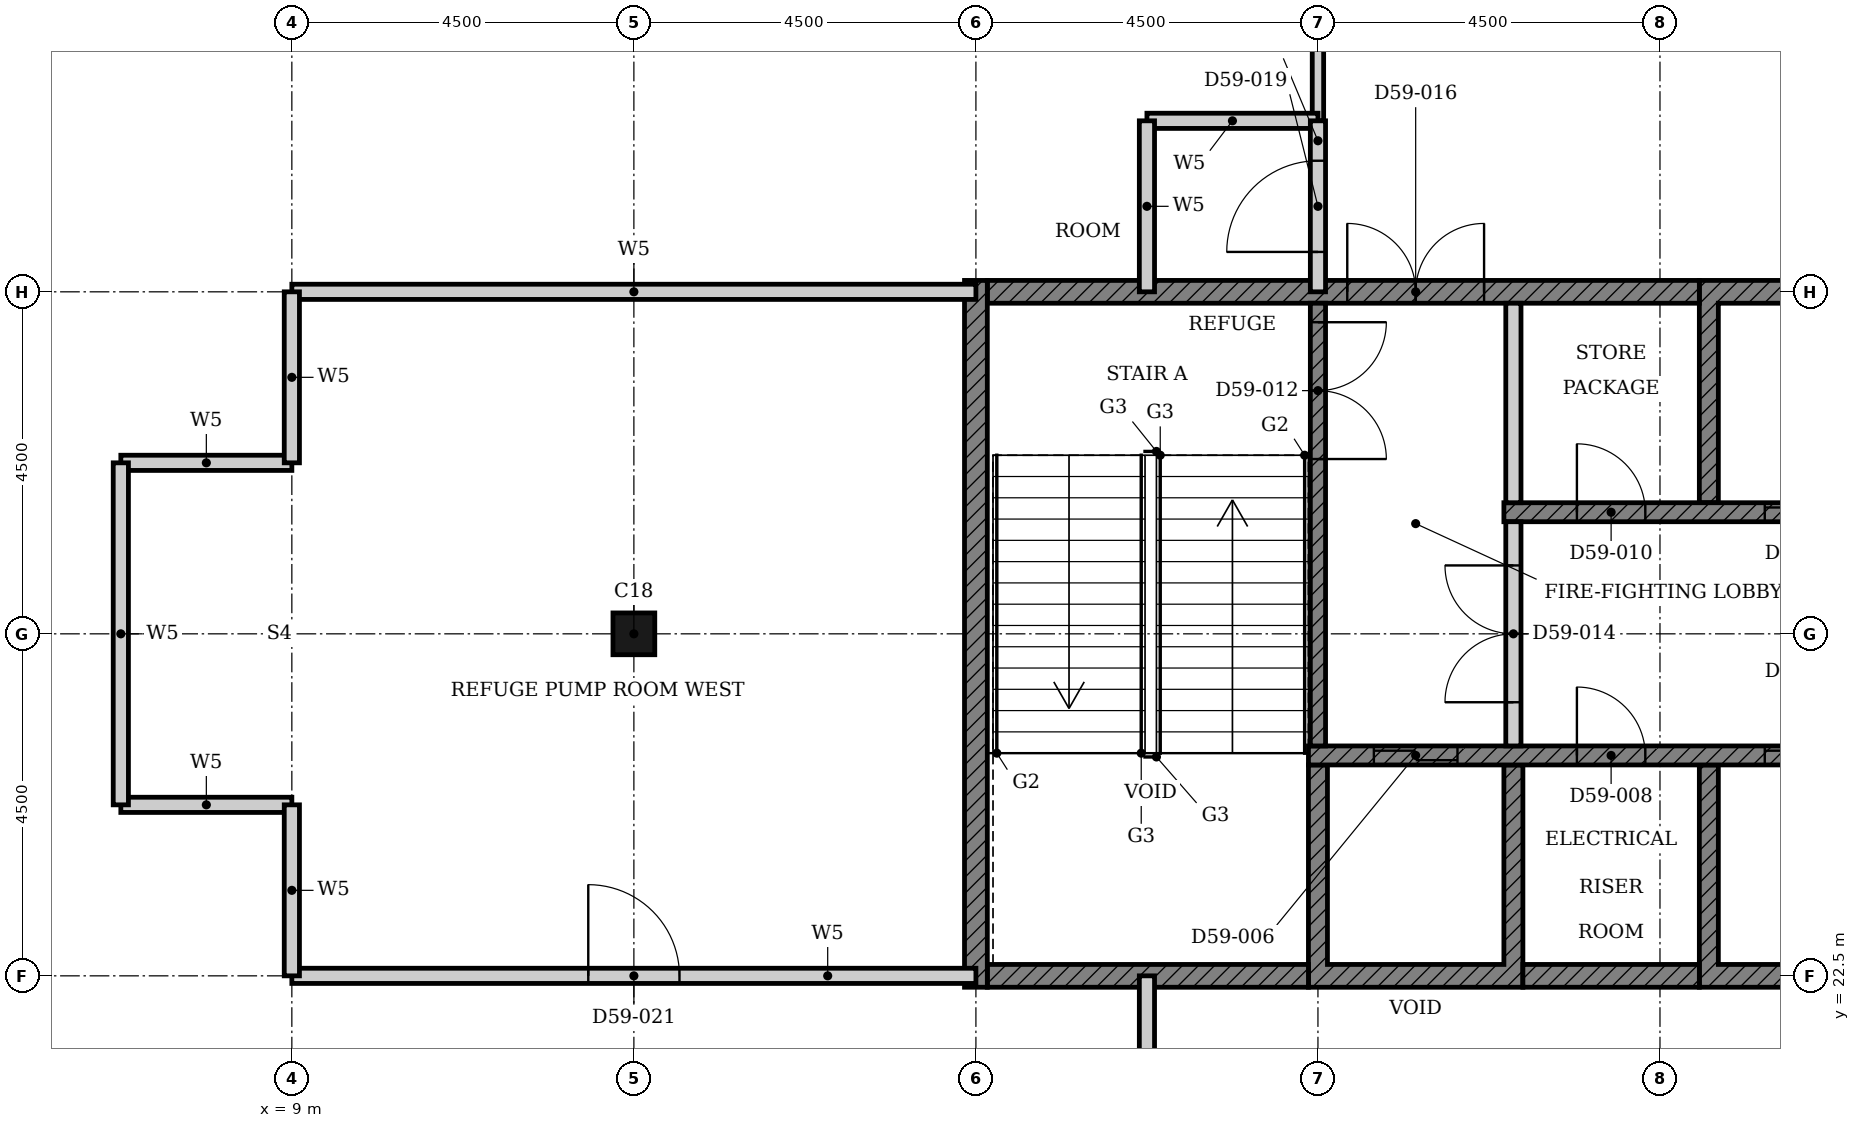
"""IFC4 building model, lengths in metres.
Left out: names, types, materials, properties, quantities, classifications, styles, units other than length and angle.
Written with IfcOpenShell. Run it as: python <this file> out.ifc"""

import sys

from ifc_helpers import new_model, si_unit, direction, frame, frame_2d, origin, origin_2d, place, context, subcontext, project, spatial, polyline, rectangle, hollow_rectangle, outline, extrude, element, fill, save


model = new_model("IFC4")
c1 = context("Model", 3, precision=1e-05, world=origin(), true_north=direction((0.0, 1.0)))
c2 = subcontext(c1, "Body", "Model", "MODEL_VIEW")
j1 = project(units=[si_unit("LENGTHUNIT", "METRE"), si_unit("PLANEANGLEUNIT", "RADIAN")], contexts=[c1])
p1 = place(None, origin())
s1 = spatial("IfcSite", under=j1, at=p1, CompositionType="ELEMENT")
p2 = place(p1, origin())
s2 = spatial("IfcBuilding", under=s1, at=p2, CompositionType="ELEMENT")
p3 = place(p2, frame((0.0, 0.0, 233.1)))
s3 = spatial("IfcBuildingStorey", under=s2, at=p3, CompositionType="ELEMENT", Elevation=233.1)
p4 = place(p3, frame((13.5, 27.0, 0.0), z_axis=(0.0, 0.0, 1.0), x_axis=(1.0, 0.0, 0.0)))
e1 = element("IfcColumn", 1, at=p4, inside=s3, PredefinedType="COLUMN", context=c2, shape_type="SweptSolid", body=[
    extrude(hollow_rectangle(XDim=0.55, YDim=0.55, WallThickness=0.018, at=origin_2d()), origin(), (0.0, 0.0, 1.0), 4.8),
])
p5 = place(p3, origin())
e2 = element("IfcWall", 2, at=p5, inside=s3, PredefinedType="SHEAR", context=c2, shape_type="SweptSolid", body=[
    extrude(outline(polyline([(22.375, 22.35), (25.197, 22.35), (25.197, 25.275), (24.947, 25.275), (24.947, 22.65), (22.625, 22.65), (22.625, 25.275), (22.375, 25.275), (22.375, 22.35)])), origin(), (0.0, 0.0, 1.0), 4.5),
])
p6 = place(p3, origin())
e3 = element("IfcWall", 3, at=p6, inside=s3, PredefinedType="SHEAR", context=c2, shape_type="SweptSolid", body=[
    extrude(outline(polyline([(27.518, 22.35), (32.911, 22.35), (32.911, 25.275), (32.661, 25.275), (32.661, 22.65), (30.339, 22.65), (30.339, 25.275), (30.089, 25.275), (30.089, 22.65), (27.768, 22.65), (27.768, 25.275), (27.518, 25.275), (27.518, 22.35)])), origin(), (0.0, 0.0, 1.0), 4.5),
])
p7 = place(p3, origin())
e4 = element("IfcWall", 4, at=p7, inside=s3, PredefinedType="SHEAR", context=c2, shape_type="SweptSolid", body=[
    extrude(outline(polyline([(27.518, 28.725), (27.768, 28.725), (27.768, 31.35), (30.089, 31.35), (30.089, 28.725), (30.339, 28.725), (30.339, 31.35), (32.661, 31.35), (32.661, 28.725), (32.911, 28.725), (32.911, 31.65), (27.518, 31.65), (27.518, 28.725)])), origin(), (0.0, 0.0, 1.0), 4.5),
])
p8 = place(p3, frame((18.15, 22.5, 0.0), z_axis=(0.0, 0.0, 1.0), x_axis=(1.0, 0.0, 0.0)))
e5 = element("IfcWall", 5, at=p8, inside=s3, PredefinedType="SHEAR", context=c2, shape_type="SweptSolid", body=[
    extrude(rectangle(XDim=4.225, YDim=0.3, at=frame_2d((2.113, 0.0))), origin(), (0.0, 0.0, 1.0), 4.5),
])
p9 = place(p3, frame((25.197, 22.5, 0.0), z_axis=(0.0, 0.0, 1.0), x_axis=(1.0, 0.0, 0.0)))
e6 = element("IfcWall", 6, at=p9, inside=s3, PredefinedType="SHEAR", context=c2, shape_type="SweptSolid", body=[
    extrude(rectangle(XDim=2.321, YDim=0.3, at=frame_2d((1.161, 0.0))), origin(), (0.0, 0.0, 1.0), 4.5),
])
p10 = place(p3, frame((18.15, 31.5, 0.0), z_axis=(0.0, 0.0, 1.0), x_axis=(1.0, 0.0, 0.0)))
e7 = element("IfcWall", 7, at=p10, inside=s3, PredefinedType="SHEAR", context=c2, shape_type="SweptSolid", body=[
    extrude(rectangle(XDim=9.368, YDim=0.3, at=frame_2d((4.684, 0.0))), origin(), (0.0, 0.0, 1.0), 4.5),
])
p11 = place(p10, frame((4.736, 0.0, 0.0)))
e8 = element("IfcOpeningElement", 8, at=p11, cuts=e7, PredefinedType="OPENING", context=c2, shape_type="SweptSolid", body=[
    extrude(rectangle(XDim=1.8, YDim=2.1, at=frame_2d((0.9, 1.05))), frame((0.0, 0.16, 0.0), z_axis=(0.0, -1.0, 0.0), x_axis=(1.0, 0.0, 0.0)), (0.0, 0.0, 1.0), 0.32),
])
p12 = place(p3, frame((18.0, 22.35, 0.0), z_axis=(0.0, 0.0, 1.0), x_axis=(0.0, 1.0, 0.0)))
e9 = element("IfcWall", 9, at=p12, inside=s3, PredefinedType="SHEAR", context=c2, shape_type="SweptSolid", body=[
    extrude(rectangle(XDim=9.3, YDim=0.3, at=frame_2d((4.65, 0.0))), origin(), (0.0, 0.0, 1.0), 4.5),
])
p13 = place(p3, frame((22.375, 25.4, 0.0), z_axis=(0.0, 0.0, 1.0), x_axis=(1.0, 0.0, 0.0)))
e10 = element("IfcWall", 10, at=p13, inside=s3, PredefinedType="SHEAR", context=c2, shape_type="SweptSolid", body=[
    extrude(rectangle(XDim=15.678, YDim=0.25, at=frame_2d((7.839, 0.0))), origin(), (0.0, 0.0, 1.0), 4.5),
])
p14 = place(p13, frame((8.575, 0.0, 0.0)))
e11 = element("IfcOpeningElement", 11, at=p14, cuts=e10, PredefinedType="OPENING", context=c2, shape_type="SweptSolid", body=[
    extrude(rectangle(XDim=1.1, YDim=2.1, at=frame_2d((0.55, 1.05))), frame((0.0, 0.135, 0.0), z_axis=(0.0, -1.0, 0.0), x_axis=(1.0, 0.0, 0.0)), (0.0, 0.0, 1.0), 0.27),
])
p15 = place(p13, frame((6.004, 0.0, 0.0)))
e12 = element("IfcOpeningElement", 12, at=p15, cuts=e10, PredefinedType="OPENING", context=c2, shape_type="SweptSolid", body=[
    extrude(rectangle(XDim=1.1, YDim=2.1, at=frame_2d((0.55, 1.05))), frame((0.0, 0.135, 0.0), z_axis=(0.0, -1.0, 0.0), x_axis=(1.0, 0.0, 0.0)), (0.0, 0.0, 1.0), 0.27),
])
p16 = place(p13, frame((0.861, 0.0, 0.0)))
e13 = element("IfcOpeningElement", 13, at=p16, cuts=e10, PredefinedType="OPENING", context=c2, shape_type="SweptSolid", body=[
    extrude(rectangle(XDim=1.1, YDim=2.1, at=frame_2d((0.55, 1.05))), frame((0.0, 0.135, 0.0), z_axis=(0.0, -1.0, 0.0), x_axis=(1.0, 0.0, 0.0)), (0.0, 0.0, 1.0), 0.27),
])
p17 = place(p13, frame((3.532, 0.0, 0.0)))
e14 = element("IfcOpeningElement", 14, at=p17, cuts=e10, PredefinedType="OPENING", context=c2, shape_type="SweptSolid", body=[
    extrude(rectangle(XDim=0.9, YDim=2.1, at=frame_2d((0.45, 1.05))), frame((0.0, 0.135, 0.0), z_axis=(0.0, -1.0, 0.0), x_axis=(1.0, 0.0, 0.0)), (0.0, 0.0, 1.0), 0.27),
])
p18 = place(p13, frame((12.532, 0.0, 0.0)))
e15 = element("IfcOpeningElement", 15, at=p18, cuts=e10, PredefinedType="OPENING", context=c2, shape_type="SweptSolid", body=[
    extrude(rectangle(XDim=0.9, YDim=2.1, at=frame_2d((0.45, 1.05))), frame((0.0, 0.135, 0.0), z_axis=(0.0, -1.0, 0.0), x_axis=(1.0, 0.0, 0.0)), (0.0, 0.0, 1.0), 0.27),
])
p19 = place(p3, frame((24.947, 28.6, 0.0), z_axis=(0.0, 0.0, 1.0), x_axis=(1.0, 0.0, 0.0)))
e16 = element("IfcWall", 16, at=p19, inside=s3, PredefinedType="SHEAR", context=c2, shape_type="SweptSolid", body=[
    extrude(rectangle(XDim=15.678, YDim=0.25, at=frame_2d((7.839, 0.0))), origin(), (0.0, 0.0, 1.0), 4.5),
])
p20 = place(p19, frame((6.004, 0.0, 0.0)))
e17 = element("IfcOpeningElement", 17, at=p20, cuts=e16, PredefinedType="OPENING", context=c2, shape_type="SweptSolid", body=[
    extrude(rectangle(XDim=1.1, YDim=2.1, at=frame_2d((0.55, 1.05))), frame((0.0, 0.135, 0.0), z_axis=(0.0, -1.0, 0.0), x_axis=(1.0, 0.0, 0.0)), (0.0, 0.0, 1.0), 0.27),
])
p21 = place(p19, frame((11.146, 0.0, 0.0)))
e18 = element("IfcOpeningElement", 18, at=p21, cuts=e16, PredefinedType="OPENING", context=c2, shape_type="SweptSolid", body=[
    extrude(rectangle(XDim=1.1, YDim=2.1, at=frame_2d((0.55, 1.05))), frame((0.0, 0.135, 0.0), z_axis=(0.0, -1.0, 0.0), x_axis=(1.0, 0.0, 0.0)), (0.0, 0.0, 1.0), 0.27),
])
p22 = place(p19, frame((3.432, 0.0, 0.0)))
e19 = element("IfcOpeningElement", 19, at=p22, cuts=e16, PredefinedType="OPENING", context=c2, shape_type="SweptSolid", body=[
    extrude(rectangle(XDim=1.1, YDim=2.1, at=frame_2d((0.55, 1.05))), frame((0.0, 0.135, 0.0), z_axis=(0.0, -1.0, 0.0), x_axis=(1.0, 0.0, 0.0)), (0.0, 0.0, 1.0), 0.27),
])
p23 = place(p19, frame((13.718, 0.0, 0.0)))
e20 = element("IfcOpeningElement", 20, at=p23, cuts=e16, PredefinedType="OPENING", context=c2, shape_type="SweptSolid", body=[
    extrude(rectangle(XDim=1.1, YDim=2.1, at=frame_2d((0.55, 1.05))), frame((0.0, 0.135, 0.0), z_axis=(0.0, -1.0, 0.0), x_axis=(1.0, 0.0, 0.0)), (0.0, 0.0, 1.0), 0.27),
])
p24 = place(p19, frame((0.961, 0.0, 0.0)))
e21 = element("IfcOpeningElement", 21, at=p24, cuts=e16, PredefinedType="OPENING", context=c2, shape_type="SweptSolid", body=[
    extrude(rectangle(XDim=0.9, YDim=2.1, at=frame_2d((0.45, 1.05))), frame((0.0, 0.135, 0.0), z_axis=(0.0, -1.0, 0.0), x_axis=(1.0, 0.0, 0.0)), (0.0, 0.0, 1.0), 0.27),
])
p25 = place(p19, frame((8.675, 0.0, 0.0)))
e22 = element("IfcOpeningElement", 22, at=p25, cuts=e16, PredefinedType="OPENING", context=c2, shape_type="SweptSolid", body=[
    extrude(rectangle(XDim=0.9, YDim=2.1, at=frame_2d((0.45, 1.05))), frame((0.0, 0.135, 0.0), z_axis=(0.0, -1.0, 0.0), x_axis=(1.0, 0.0, 0.0)), (0.0, 0.0, 1.0), 0.27),
])
p26 = place(p3, frame((25.072, 28.725, 0.0), z_axis=(0.0, 0.0, 1.0), x_axis=(0.0, 1.0, 0.0)))
e23 = element("IfcWall", 23, at=p26, inside=s3, PredefinedType="PARTITIONING", context=c2, shape_type="SweptSolid", body=[
    extrude(rectangle(XDim=2.625, YDim=0.2, at=frame_2d((1.312, 0.0))), origin(), (0.0, 0.0, 1.0), 4.5),
])
p27 = place(p3, frame((22.5, 31.35, 0.0), z_axis=(0.0, 0.0, 1.0), x_axis=(0.0, -1.0, 0.0)))
e24 = element("IfcWall", 24, at=p27, inside=s3, PredefinedType="SHEAR", context=c2, shape_type="SweptSolid", body=[
    extrude(rectangle(XDim=5.825, YDim=0.2, at=frame_2d((2.913, 0.0))), origin(), (0.0, 0.0, 1.0), 4.5),
])
p28 = place(p27, frame((0.25, 0.0, 0.0)))
e25 = element("IfcOpeningElement", 25, at=p28, cuts=e24, PredefinedType="OPENING", context=c2, shape_type="SweptSolid", body=[
    extrude(rectangle(XDim=1.8, YDim=2.1, at=frame_2d((0.9, 1.05))), frame((0.0, 0.11, 0.0), z_axis=(0.0, -1.0, 0.0), x_axis=(1.0, 0.0, 0.0)), (0.0, 0.0, 1.0), 0.22),
])
p29 = place(p3, frame((25.072, 25.525, 0.0), z_axis=(0.0, 0.0, 1.0), x_axis=(0.0, 1.0, 0.0)))
e26 = element("IfcWall", 26, at=p29, inside=s3, PredefinedType="PARTITIONING", context=c2, shape_type="SweptSolid", body=[
    extrude(rectangle(XDim=2.95, YDim=0.2, at=frame_2d((1.475, 0.0))), origin(), (0.0, 0.0, 1.0), 4.5),
])
p30 = place(p29, frame((0.575, 0.0, 0.0)))
e27 = element("IfcOpeningElement", 27, at=p30, cuts=e26, PredefinedType="OPENING", context=c2, shape_type="SweptSolid", body=[
    extrude(rectangle(XDim=1.8, YDim=2.1, at=frame_2d((0.9, 1.05))), frame((0.0, 0.11, 0.0), z_axis=(0.0, -1.0, 0.0), x_axis=(1.0, 0.0, 0.0)), (0.0, 0.0, 1.0), 0.22),
])
p31 = place(p3, frame((22.5, 33.75, 0.0), z_axis=(0.0, 0.0, 1.0), x_axis=(0.0, 1.0, 0.0)))
e28 = element("IfcWall", 28, at=p31, inside=s3, PredefinedType="PARTITIONING", context=c2, shape_type="SweptSolid", body=[
    extrude(rectangle(XDim=2.25, YDim=0.15, at=frame_2d((1.125, 0.0))), origin(), (0.0, 0.0, 1.0), 4.5),
])
p32 = place(p3, frame((9.0, 22.5, 0.0), z_axis=(0.0, 0.0, 1.0), x_axis=(1.0, 0.0, 0.0)))
e29 = element("IfcWall", 29, at=p32, inside=s3, PredefinedType="PARTITIONING", context=c2, shape_type="SweptSolid", body=[
    extrude(rectangle(XDim=9.0, YDim=0.2, at=frame_2d((4.5, 0.0))), origin(), (0.0, 0.0, 1.0), 3.78),
])
p33 = place(p32, frame((3.9, 0.0, 0.0)))
e30 = element("IfcOpeningElement", 30, at=p33, cuts=e29, PredefinedType="OPENING", context=c2, shape_type="SweptSolid", body=[
    extrude(rectangle(XDim=1.2, YDim=2.1, at=frame_2d((0.6, 1.05))), frame((0.0, 0.11, 0.0), z_axis=(0.0, -1.0, 0.0), x_axis=(1.0, 0.0, 0.0)), (0.0, 0.0, 1.0), 0.22),
])
for number, where, z_axis, x_axis in (
    (31, (6.75, 24.75, 0.0), (0.0, 0.0, 1.0), (1.0, 0.0, 0.0)),
    (32, (6.75, 29.25, 0.0), (0.0, 0.0, 1.0), (1.0, 0.0, 0.0)),
):
    element("IfcWall", number, at=place(p3, frame(where, z_axis=z_axis, x_axis=x_axis)), inside=s3, PredefinedType="PARTITIONING", context=c2, shape_type="SweptSolid", body=[
        extrude(rectangle(XDim=2.25, YDim=0.2, at=frame_2d((1.125, 0.0))), origin(), (0.0, 0.0, 1.0), 4.5),
    ])
p34 = place(p3, frame((9.0, 31.5, 0.0), z_axis=(0.0, 0.0, 1.0), x_axis=(1.0, 0.0, 0.0)))
e33 = element("IfcWall", 33, at=p34, inside=s3, PredefinedType="PARTITIONING", context=c2, shape_type="SweptSolid", body=[
    extrude(rectangle(XDim=9.0, YDim=0.2, at=frame_2d((4.5, 0.0))), origin(), (0.0, 0.0, 1.0), 3.78),
])
for number, where, z_axis, x_axis in (
    (34, (20.25, 33.75, 0.0), (0.0, 0.0, 1.0), (1.0, 0.0, 0.0)),
    (35, (20.25, 20.25, 0.0), (0.0, 0.0, 1.0), (0.0, 1.0, 0.0)),
    (36, (20.25, 31.5, 0.0), (0.0, 0.0, 1.0), (0.0, 1.0, 0.0)),
):
    element("IfcWall", number, at=place(p3, frame(where, z_axis=z_axis, x_axis=x_axis)), inside=s3, PredefinedType="PARTITIONING", context=c2, shape_type="SweptSolid", body=[
        extrude(rectangle(XDim=2.25, YDim=0.2, at=frame_2d((1.125, 0.0))), origin(), (0.0, 0.0, 1.0), 4.5),
    ])
p35 = place(p3, frame((22.5, 31.5, 0.0), z_axis=(0.0, 0.0, 1.0), x_axis=(0.0, 1.0, 0.0)))
e37 = element("IfcWall", 37, at=p35, inside=s3, PredefinedType="PARTITIONING", context=c2, shape_type="SweptSolid", body=[
    extrude(rectangle(XDim=2.25, YDim=0.2, at=frame_2d((1.125, 0.0))), origin(), (0.0, 0.0, 1.0), 4.5),
])
p36 = place(p35, frame((0.525, 0.0, 0.0)))
e38 = element("IfcOpeningElement", 38, at=p36, cuts=e37, PredefinedType="OPENING", context=c2, shape_type="SweptSolid", body=[
    extrude(rectangle(XDim=1.2, YDim=2.1, at=frame_2d((0.6, 1.05))), frame((0.0, 0.11, 0.0), z_axis=(0.0, -1.0, 0.0), x_axis=(1.0, 0.0, 0.0)), (0.0, 0.0, 1.0), 0.22),
])
p37 = place(p3, frame((6.75, 24.75, 0.0), z_axis=(0.0, 0.0, 1.0), x_axis=(0.0, 1.0, 0.0)))
e39 = element("IfcWall", 39, at=p37, inside=s3, PredefinedType="PARTITIONING", context=c2, shape_type="SweptSolid", body=[
    extrude(rectangle(XDim=4.5, YDim=0.2, at=frame_2d((2.25, 0.0))), origin(), (0.0, 0.0, 1.0), 4.5),
])
for number, where, z_axis, x_axis in (
    (40, (9.0, 22.5, 0.0), (0.0, 0.0, 1.0), (0.0, 1.0, 0.0)),
    (41, (9.0, 29.25, 0.0), (0.0, 0.0, 1.0), (0.0, 1.0, 0.0)),
):
    element("IfcWall", number, at=place(p3, frame(where, z_axis=z_axis, x_axis=x_axis)), inside=s3, PredefinedType="PARTITIONING", context=c2, shape_type="SweptSolid", body=[
        extrude(rectangle(XDim=2.25, YDim=0.2, at=frame_2d((1.125, 0.0))), origin(), (0.0, 0.0, 1.0), 4.5),
    ])
p38 = place(p15, origin())
e42 = element("IfcDoor", 42, at=p38, inside=s3, OperationType="DOUBLE_DOOR_SLIDING", PredefinedType="DOOR", context=c2, shape_type="SweptSolid", body=[
    extrude(rectangle(XDim=1.1, YDim=2.1, at=frame_2d((0.55, 1.05))), frame((0.0, 0.025, 0.0), z_axis=(0.0, -1.0, 0.0), x_axis=(1.0, 0.0, 0.0)), (0.0, 0.0, 1.0), 0.05),
])
fill(e12, e42)
p39 = place(p22, origin())
e43 = element("IfcDoor", 43, at=p39, inside=s3, OperationType="DOUBLE_DOOR_SLIDING", PredefinedType="DOOR", context=c2, shape_type="SweptSolid", body=[
    extrude(rectangle(XDim=1.1, YDim=2.1, at=frame_2d((0.55, 1.05))), frame((0.0, 0.025, 0.0), z_axis=(0.0, -1.0, 0.0), x_axis=(1.0, 0.0, 0.0)), (0.0, 0.0, 1.0), 0.05),
])
fill(e19, e43)
p40 = place(p16, origin())
e44 = element("IfcDoor", 44, at=p40, inside=s3, OperationType="DOUBLE_DOOR_SLIDING", PredefinedType="DOOR", context=c2, shape_type="SweptSolid", body=[
    extrude(rectangle(XDim=1.1, YDim=2.1, at=frame_2d((0.55, 1.05))), frame((0.0, 0.025, 0.0), z_axis=(0.0, -1.0, 0.0), x_axis=(1.0, 0.0, 0.0)), (0.0, 0.0, 1.0), 0.05),
])
fill(e13, e44)
p41 = place(p17, origin())
e45 = element("IfcDoor", 45, at=p41, inside=s3, OperationType="SINGLE_SWING_LEFT", PredefinedType="DOOR", context=c2, shape_type="SweptSolid", body=[
    extrude(rectangle(XDim=0.9, YDim=2.1, at=frame_2d((0.45, 1.05))), frame((0.0, 0.025, 0.0), z_axis=(0.0, -1.0, 0.0), x_axis=(1.0, 0.0, 0.0)), (0.0, 0.0, 1.0), 0.05),
])
fill(e14, e45)
p42 = place(p24, origin())
e46 = element("IfcDoor", 46, at=p42, inside=s3, OperationType="SINGLE_SWING_LEFT", PredefinedType="DOOR", context=c2, shape_type="SweptSolid", body=[
    extrude(rectangle(XDim=0.9, YDim=2.1, at=frame_2d((0.45, 1.05))), frame((0.0, 0.025, 0.0), z_axis=(0.0, -1.0, 0.0), x_axis=(1.0, 0.0, 0.0)), (0.0, 0.0, 1.0), 0.05),
])
fill(e21, e46)
p43 = place(p28, origin())
e47 = element("IfcDoor", 47, at=p43, inside=s3, OperationType="DOUBLE_DOOR_SINGLE_SWING", PredefinedType="DOOR", context=c2, shape_type="SweptSolid", body=[
    extrude(rectangle(XDim=1.8, YDim=2.1, at=frame_2d((0.9, 1.05))), frame((0.0, 0.025, 0.0), z_axis=(0.0, -1.0, 0.0), x_axis=(1.0, 0.0, 0.0)), (0.0, 0.0, 1.0), 0.05),
])
fill(e25, e47)
p44 = place(p30, origin())
e48 = element("IfcDoor", 48, at=p44, inside=s3, OperationType="DOUBLE_DOOR_SINGLE_SWING", PredefinedType="DOOR", context=c2, shape_type="SweptSolid", body=[
    extrude(rectangle(XDim=1.8, YDim=2.1, at=frame_2d((0.9, 1.05))), frame((0.0, 0.025, 0.0), z_axis=(0.0, -1.0, 0.0), x_axis=(1.0, 0.0, 0.0)), (0.0, 0.0, 1.0), 0.05),
])
fill(e27, e48)
p45 = place(p11, origin())
e49 = element("IfcDoor", 49, at=p45, inside=s3, OperationType="DOUBLE_DOOR_SINGLE_SWING", PredefinedType="DOOR", context=c2, shape_type="SweptSolid", body=[
    extrude(rectangle(XDim=1.8, YDim=2.1, at=frame_2d((0.9, 1.05))), frame((0.0, 0.025, 0.0), z_axis=(0.0, -1.0, 0.0), x_axis=(1.0, 0.0, 0.0)), (0.0, 0.0, 1.0), 0.05),
])
fill(e8, e49)
p46 = place(p36, origin())
e50 = element("IfcDoor", 50, at=p46, inside=s3, OperationType="SINGLE_SWING_RIGHT", PredefinedType="DOOR", context=c2, shape_type="SweptSolid", body=[
    extrude(rectangle(XDim=1.2, YDim=2.1, at=frame_2d((0.6, 1.05))), frame((0.0, 0.025, 0.0), z_axis=(0.0, -1.0, 0.0), x_axis=(1.0, 0.0, 0.0)), (0.0, 0.0, 1.0), 0.05),
])
fill(e38, e50)
p47 = place(p33, origin())
e51 = element("IfcDoor", 51, at=p47, inside=s3, OperationType="SINGLE_SWING_LEFT", PredefinedType="DOOR", context=c2, shape_type="SweptSolid", body=[
    extrude(rectangle(XDim=1.2, YDim=2.1, at=frame_2d((0.6, 1.05))), frame((0.0, 0.025, 0.0), z_axis=(0.0, -1.0, 0.0), x_axis=(1.0, 0.0, 0.0)), (0.0, 0.0, 1.0), 0.05),
])
fill(e30, e51)
save(model, sys.argv[1])
